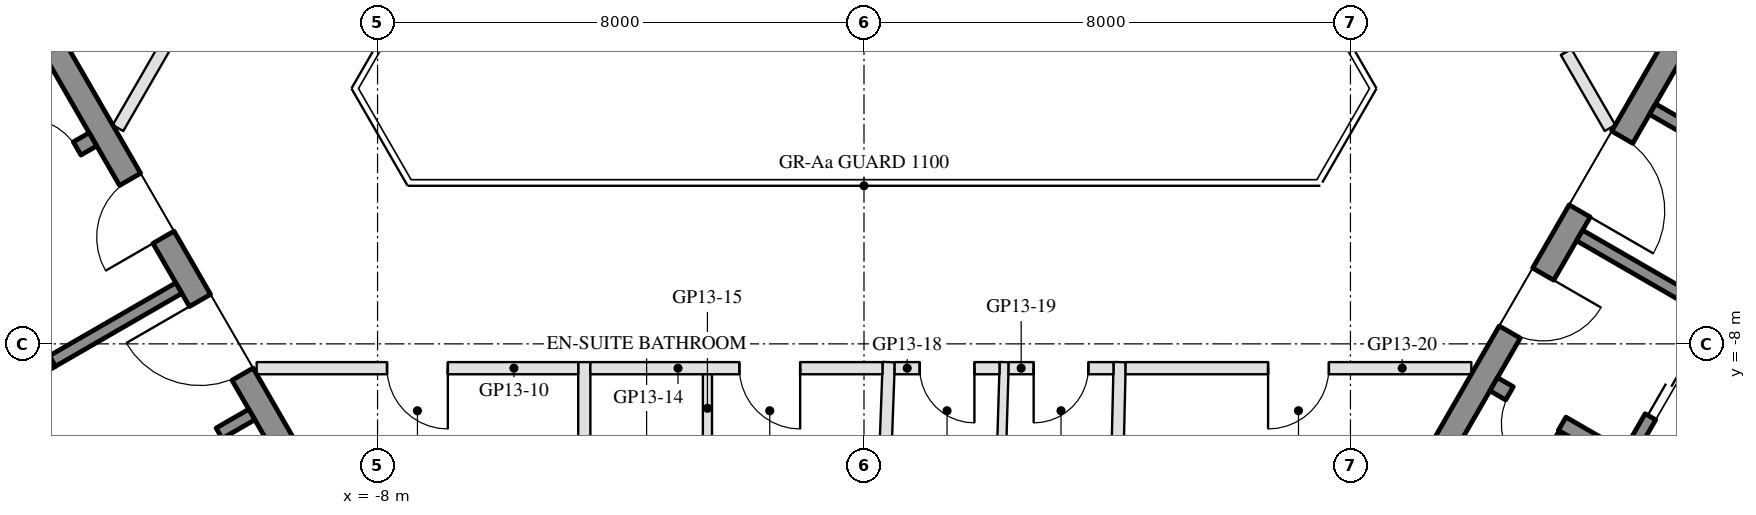
"""IFC4 building model, lengths in metres.
Left out: names, types, materials, properties, quantities, classifications, styles, units other than length and angle.
Written with IfcOpenShell. Run it as: python <this file> out.ifc"""

import sys

from ifc_helpers import new_model, si_unit, direction, frame, frame_2d, origin, place, context, subcontext, project, spatial, rectangle, extrude, element, fill, save


model = new_model("IFC4")
c1 = context("Model", 3, precision=1e-05, world=origin(), true_north=direction((0.0, 1.0)))
c2 = subcontext(c1, "Body", "Model", "MODEL_VIEW")
j1 = project(units=[si_unit("LENGTHUNIT", "METRE"), si_unit("PLANEANGLEUNIT", "RADIAN")], contexts=[c1])
p1 = place(None, origin())
s1 = spatial("IfcSite", under=j1, at=p1, CompositionType="ELEMENT")
p2 = place(p1, origin())
s2 = spatial("IfcBuilding", under=s1, at=p2, CompositionType="ELEMENT")
p3 = place(p2, frame((0.0, 0.0, 154.0)))
s3 = spatial("IfcBuildingStorey", under=s2, at=p3, CompositionType="ELEMENT", Elevation=154.0)
p4 = place(p3, frame((-13.845, -2.22, 0.0), z_axis=(0.0, 0.0, 1.0), x_axis=(0.500004234368, -0.866022959057, 0.0)))
e1 = element("IfcWall", 1, at=p4, inside=s3, PredefinedType="SHEAR", context=c2, shape_type="SweptSolid", body=[
    extrude(rectangle(XDim=10.0, YDim=0.4, at=frame_2d((5.0, 0.0))), origin(), (0.0, 0.0, 1.0), 3.5),
])
p5 = place(p4, frame((3.55, 0.0, 0.0)))
e2 = element("IfcOpeningElement", 2, at=p5, cuts=e1, PredefinedType="OPENING", context=c2, shape_type="SweptSolid", body=[
    extrude(rectangle(XDim=1.1, YDim=2.1, at=frame_2d((0.55, 1.05))), frame((0.0, 0.21, 0.0), z_axis=(0.0, -1.0, 0.0), x_axis=(1.0, 0.0, 0.0)), (0.0, 0.0, 1.0), 0.42),
])
p6 = place(p4, frame((5.85, 0.0, 0.0)))
e3 = element("IfcOpeningElement", 3, at=p6, cuts=e1, PredefinedType="OPENING", context=c2, shape_type="SweptSolid", body=[
    extrude(rectangle(XDim=1.4, YDim=2.1, at=frame_2d((0.7, 1.05))), frame((0.0, 0.21, 0.0), z_axis=(0.0, -1.0, 0.0), x_axis=(1.0, 0.0, 0.0)), (0.0, 0.0, 1.0), 0.42),
])
p7 = place(p3, frame((-12.681, -4.636, 0.0), z_axis=(0.0, 0.0, 1.0), x_axis=(-0.866021702275, -0.500006411147, 0.0)))
e4 = element("IfcWall", 4, at=p7, inside=s3, PredefinedType="SHEAR", context=c2, shape_type="SweptSolid", body=[
    extrude(rectangle(XDim=6.45, YDim=0.25, at=frame_2d((3.225, 0.0))), origin(), (0.0, 0.0, 1.0), 3.5),
])
p8 = place(p7, frame((0.3, 0.0, 0.0)))
e5 = element("IfcOpeningElement", 5, at=p8, cuts=e4, PredefinedType="OPENING", context=c2, shape_type="SweptSolid", body=[
    extrude(rectangle(XDim=1.0, YDim=2.1, at=frame_2d((0.5, 1.05))), frame((0.0, 0.135, 0.0), z_axis=(0.0, -1.0, 0.0), x_axis=(1.0, 0.0, 0.0)), (0.0, 0.0, 1.0), 0.27),
])
p9 = place(p3, frame((-14.783, -5.995, 0.0), z_axis=(0.0, 0.0, 1.0), x_axis=(0.49994636267, -0.866056369097, 0.0)))
e6 = element("IfcWall", 6, at=p9, inside=s3, PredefinedType="SHEAR", context=c2, shape_type="SweptSolid", body=[
    extrude(rectangle(XDim=2.8, YDim=0.2, at=frame_2d((1.4, 0.0))), origin(), (0.0, 0.0, 1.0), 3.5),
])
p10 = place(p9, frame((0.7, 0.0, 0.0)))
e7 = element("IfcOpeningElement", 7, at=p10, cuts=e6, PredefinedType="OPENING", context=c2, shape_type="SweptSolid", body=[
    extrude(rectangle(XDim=1.2, YDim=2.1, at=frame_2d((0.6, 1.05))), frame((0.0, 0.11, 0.0), z_axis=(0.0, -1.0, 0.0), x_axis=(1.0, 0.0, 0.0)), (0.0, 0.0, 1.0), 0.22),
])
p11 = place(p3, frame((-11.268, -7.083, 0.0), z_axis=(0.0, 0.0, 1.0), x_axis=(-0.866050077142, -0.499957262057, 0.0)))
e8 = element("IfcWall", 8, at=p11, inside=s3, PredefinedType="SHEAR", context=c2, shape_type="SweptSolid", body=[
    extrude(rectangle(XDim=2.4, YDim=0.2, at=frame_2d((1.2, 0.0))), origin(), (0.0, 0.0, 1.0), 3.5),
])
p12 = place(p3, frame((-10.068, -9.162, 0.0), z_axis=(0.0, 0.0, 1.0), x_axis=(-0.866032725843, -0.499987317609, 0.0)))
e9 = element("IfcWall", 9, at=p12, inside=s3, PredefinedType="SHEAR", context=c2, shape_type="SweptSolid", body=[
    extrude(rectangle(XDim=10.16, YDim=0.2, at=frame_2d((5.08, 0.0))), origin(), (0.0, 0.0, 1.0), 3.5),
])
p13 = place(p12, frame((0.62, 0.0, 0.0)))
e10 = element("IfcOpeningElement", 10, at=p13, cuts=e9, PredefinedType="OPENING", context=c2, shape_type="SweptSolid", body=[
    extrude(rectangle(XDim=1.1, YDim=2.1, at=frame_2d((0.55, 1.05))), frame((0.0, 0.11, 0.0), z_axis=(0.0, -1.0, 0.0), x_axis=(1.0, 0.0, 0.0)), (0.0, 0.0, 1.0), 0.22),
])
p14 = place(p12, frame((3.16, 0.0, 0.0)))
e11 = element("IfcOpeningElement", 11, at=p14, cuts=e9, PredefinedType="OPENING", context=c2, shape_type="SweptSolid", body=[
    extrude(rectangle(XDim=1.1, YDim=2.1, at=frame_2d((0.55, 1.05))), frame((0.0, 0.11, 0.0), z_axis=(0.0, -1.0, 0.0), x_axis=(1.0, 0.0, 0.0)), (0.0, 0.0, 1.0), 0.22),
])
p15 = place(p12, frame((5.7, 0.0, 0.0)))
e12 = element("IfcOpeningElement", 12, at=p15, cuts=e9, PredefinedType="OPENING", context=c2, shape_type="SweptSolid", body=[
    extrude(rectangle(XDim=1.1, YDim=2.1, at=frame_2d((0.55, 1.05))), frame((0.0, 0.11, 0.0), z_axis=(0.0, -1.0, 0.0), x_axis=(1.0, 0.0, 0.0)), (0.0, 0.0, 1.0), 0.22),
])
p16 = place(p12, frame((8.24, 0.0, 0.0)))
e13 = element("IfcOpeningElement", 13, at=p16, cuts=e9, PredefinedType="OPENING", context=c2, shape_type="SweptSolid", body=[
    extrude(rectangle(XDim=1.1, YDim=2.1, at=frame_2d((0.55, 1.05))), frame((0.0, 0.11, 0.0), z_axis=(0.0, -1.0, 0.0), x_axis=(1.0, 0.0, 0.0)), (0.0, 0.0, 1.0), 0.22),
])
p17 = place(p3, frame((8.845, -10.88, 0.0), z_axis=(0.0, 0.0, 1.0), x_axis=(0.500004234368, 0.866022959057, 0.0)))
e14 = element("IfcWall", 14, at=p17, inside=s3, PredefinedType="SHEAR", context=c2, shape_type="SweptSolid", body=[
    extrude(rectangle(XDim=10.0, YDim=0.4, at=frame_2d((5.0, 0.0))), origin(), (0.0, 0.0, 1.0), 3.5),
])
p18 = place(p17, frame((3.55, 0.0, 0.0)))
e15 = element("IfcOpeningElement", 15, at=p18, cuts=e14, PredefinedType="OPENING", context=c2, shape_type="SweptSolid", body=[
    extrude(rectangle(XDim=1.1, YDim=2.1, at=frame_2d((0.55, 1.05))), frame((0.0, 0.21, 0.0), z_axis=(0.0, -1.0, 0.0), x_axis=(1.0, 0.0, 0.0)), (0.0, 0.0, 1.0), 0.42),
])
p19 = place(p17, frame((5.85, 0.0, 0.0)))
e16 = element("IfcOpeningElement", 16, at=p19, cuts=e14, PredefinedType="OPENING", context=c2, shape_type="SweptSolid", body=[
    extrude(rectangle(XDim=1.4, YDim=2.1, at=frame_2d((0.7, 1.05))), frame((0.0, 0.21, 0.0), z_axis=(0.0, -1.0, 0.0), x_axis=(1.0, 0.0, 0.0)), (0.0, 0.0, 1.0), 0.42),
])
p20 = place(p3, frame((10.356, -8.664, 0.0), z_axis=(0.0, 0.0, 1.0), x_axis=(0.866028629588, -0.499994412703, 0.0)))
e17 = element("IfcWall", 17, at=p20, inside=s3, PredefinedType="SHEAR", context=c2, shape_type="SweptSolid", body=[
    extrude(rectangle(XDim=6.45, YDim=0.25, at=frame_2d((3.225, 0.0))), origin(), (0.0, 0.0, 1.0), 3.5),
])
p21 = place(p20, frame((0.3, 0.0, 0.0)))
e18 = element("IfcOpeningElement", 18, at=p21, cuts=e17, PredefinedType="OPENING", context=c2, shape_type="SweptSolid", body=[
    extrude(rectangle(XDim=1.0, YDim=2.1, at=frame_2d((0.5, 1.05))), frame((0.0, 0.135, 0.0), z_axis=(0.0, -1.0, 0.0), x_axis=(1.0, 0.0, 0.0)), (0.0, 0.0, 1.0), 0.27),
])
p22 = place(p3, frame((12.583, -9.805, 0.0), z_axis=(0.0, 0.0, 1.0), x_axis=(0.49994636267, 0.866056369097, 0.0)))
e19 = element("IfcWall", 19, at=p22, inside=s3, PredefinedType="SHEAR", context=c2, shape_type="SweptSolid", body=[
    extrude(rectangle(XDim=2.8, YDim=0.2, at=frame_2d((1.4, 0.0))), origin(), (0.0, 0.0, 1.0), 3.5),
])
p23 = place(p22, frame((0.7, 0.0, 0.0)))
e20 = element("IfcOpeningElement", 20, at=p23, cuts=e19, PredefinedType="OPENING", context=c2, shape_type="SweptSolid", body=[
    extrude(rectangle(XDim=1.2, YDim=2.1, at=frame_2d((0.6, 1.05))), frame((0.0, 0.11, 0.0), z_axis=(0.0, -1.0, 0.0), x_axis=(1.0, 0.0, 0.0)), (0.0, 0.0, 1.0), 0.22),
])
p24 = place(p3, frame((11.768, -6.217, 0.0), z_axis=(0.0, 0.0, 1.0), x_axis=(0.866050077142, -0.499957262057, 0.0)))
e21 = element("IfcWall", 21, at=p24, inside=s3, PredefinedType="SHEAR", context=c2, shape_type="SweptSolid", body=[
    extrude(rectangle(XDim=2.4, YDim=0.2, at=frame_2d((1.2, 0.0))), origin(), (0.0, 0.0, 1.0), 3.5),
])
p25 = place(p3, frame((12.968, -4.138, 0.0), z_axis=(0.0, 0.0, 1.0), x_axis=(0.866028328073, -0.49999493495, 0.0)))
e22 = element("IfcWall", 22, at=p25, inside=s3, PredefinedType="SHEAR", context=c2, shape_type="SweptSolid", body=[
    extrude(rectangle(XDim=10.16, YDim=0.2, at=frame_2d((5.08, 0.0))), origin(), (0.0, 0.0, 1.0), 3.5),
])
p26 = place(p25, frame((3.26, 0.0, 0.0)))
e23 = element("IfcOpeningElement", 23, at=p26, cuts=e22, PredefinedType="OPENING", context=c2, shape_type="SweptSolid", body=[
    extrude(rectangle(XDim=0.9, YDim=2.1, at=frame_2d((0.45, 1.05))), frame((0.0, 0.11, 0.0), z_axis=(0.0, -1.0, 0.0), x_axis=(1.0, 0.0, 0.0)), (0.0, 0.0, 1.0), 0.22),
])
p27 = place(p25, frame((8.34, 0.0, 0.0)))
e24 = element("IfcOpeningElement", 24, at=p27, cuts=e22, PredefinedType="OPENING", context=c2, shape_type="SweptSolid", body=[
    extrude(rectangle(XDim=0.9, YDim=2.1, at=frame_2d((0.45, 1.05))), frame((0.0, 0.11, 0.0), z_axis=(0.0, -1.0, 0.0), x_axis=(1.0, 0.0, 0.0)), (0.0, 0.0, 1.0), 0.22),
])
p28 = place(p3, frame((-4.6, -18.38, 0.0), z_axis=(0.0, 0.0, 1.0), x_axis=(0.0, 1.0, 0.0)))
e25 = element("IfcWall", 25, at=p28, inside=s3, PredefinedType="PARTITIONING", context=c2, shape_type="SweptSolid", body=[
    extrude(rectangle(XDim=10.08, YDim=0.2, at=frame_2d((5.04, 0.0))), origin(), (0.0, 0.0, 1.0), 3.06),
])
p29 = place(p3, frame((0.055, -17.805, 0.0), z_axis=(0.0, 0.0, 1.0), x_axis=(0.037090458059, 0.999311912228, 0.0)))
e26 = element("IfcWall", 26, at=p29, inside=s3, PredefinedType="PARTITIONING", context=c2, shape_type="SweptSolid", body=[
    extrude(rectangle(XDim=9.511, YDim=0.2, at=frame_2d((4.756, 0.0))), origin(), (0.0, 0.0, 1.0), 2.95),
])
p30 = place(p3, frame((3.95, -19.28, 0.0), z_axis=(0.0, 0.0, 1.0), x_axis=(0.023184943176, 0.999731193076, 0.0)))
e27 = element("IfcWall", 27, at=p30, inside=s3, PredefinedType="PARTITIONING", context=c2, shape_type="SweptSolid", body=[
    extrude(rectangle(XDim=10.983, YDim=0.2, at=frame_2d((5.491, 0.0))), origin(), (0.0, 0.0, 1.0), 2.95),
])
p31 = place(p3, frame((-4.7, -8.4, 0.0), z_axis=(0.0, 0.0, 1.0), x_axis=(-1.0, 0.0, 0.0)))
e28 = element("IfcWall", 28, at=p31, inside=s3, PredefinedType="PARTITIONING", context=c2, shape_type="SweptSolid", body=[
    extrude(rectangle(XDim=5.288, YDim=0.2, at=frame_2d((2.644, 0.0))), origin(), (0.0, 0.0, 1.0), 2.95),
])
p32 = place(p31, frame((2.144, 0.0, 0.0)))
e29 = element("IfcOpeningElement", 29, at=p32, cuts=e28, PredefinedType="OPENING", context=c2, shape_type="SweptSolid", body=[
    extrude(rectangle(XDim=1.0, YDim=2.1, at=frame_2d((0.5, 1.05))), frame((0.0, 0.11, 0.0), z_axis=(0.0, -1.0, 0.0), x_axis=(1.0, 0.0, 0.0)), (0.0, 0.0, 1.0), 0.22),
])
p33 = place(p3, frame((0.304, -8.4, 0.0), z_axis=(0.0, 0.0, 1.0), x_axis=(-1.0, 0.0, 0.0)))
e30 = element("IfcWall", 30, at=p33, inside=s3, PredefinedType="PARTITIONING", context=c2, shape_type="SweptSolid", body=[
    extrude(rectangle(XDim=4.804, YDim=0.2, at=frame_2d((2.402, 0.0))), origin(), (0.0, 0.0, 1.0), 2.95),
])
p34 = place(p33, frame((1.354, 0.0, 0.0)))
e31 = element("IfcOpeningElement", 31, at=p34, cuts=e30, PredefinedType="OPENING", context=c2, shape_type="SweptSolid", body=[
    extrude(rectangle(XDim=1.0, YDim=2.1, at=frame_2d((0.5, 1.05))), frame((0.0, 0.11, 0.0), z_axis=(0.0, -1.0, 0.0), x_axis=(1.0, 0.0, 0.0)), (0.0, 0.0, 1.0), 0.22),
])
p35 = place(p3, frame((-2.575, -11.3, 0.0), z_axis=(0.0, 0.0, 1.0), x_axis=(0.0, 1.0, 0.0)))
e32 = element("IfcWall", 32, at=p35, inside=s3, PredefinedType="PARTITIONING", context=c2, shape_type="SweptSolid", body=[
    extrude(rectangle(XDim=2.8, YDim=0.15, at=frame_2d((1.4, 0.0))), origin(), (0.0, 0.0, 1.0), 3.55),
])
p36 = place(p35, frame((0.5, 0.0, 0.0)))
e33 = element("IfcOpeningElement", 33, at=p36, cuts=e32, PredefinedType="OPENING", context=c2, shape_type="SweptSolid", body=[
    extrude(rectangle(XDim=0.9, YDim=2.1, at=frame_2d((0.45, 1.05))), frame((0.0, 0.085, 0.0), z_axis=(0.0, -1.0, 0.0), x_axis=(1.0, 0.0, 0.0)), (0.0, 0.0, 1.0), 0.17),
])
p37 = place(p3, frame((1.975, -19.28, 0.0), z_axis=(0.0, 0.0, 1.0), x_axis=(0.030114853757, 0.999546444935, 0.0)))
e34 = element("IfcWall", 34, at=p37, inside=s3, PredefinedType="PARTITIONING", context=c2, shape_type="SweptSolid", body=[
    extrude(rectangle(XDim=10.985, YDim=0.15, at=frame_2d((5.492, 0.0))), origin(), (0.0, 0.0, 1.0), 3.06),
])
p38 = place(p3, frame((2.228, -8.4, 0.0), z_axis=(0.0, 0.0, 1.0), x_axis=(-1.0, 0.0, 0.0)))
e35 = element("IfcWall", 35, at=p38, inside=s3, PredefinedType="PARTITIONING", context=c2, shape_type="SweptSolid", body=[
    extrude(rectangle(XDim=1.724, YDim=0.2, at=frame_2d((0.862, 0.0))), origin(), (0.0, 0.0, 1.0), 3.55),
])
p39 = place(p38, frame((0.412, 0.0, 0.0)))
e36 = element("IfcOpeningElement", 36, at=p39, cuts=e35, PredefinedType="OPENING", context=c2, shape_type="SweptSolid", body=[
    extrude(rectangle(XDim=0.9, YDim=2.1, at=frame_2d((0.45, 1.05))), frame((0.0, 0.11, 0.0), z_axis=(0.0, -1.0, 0.0), x_axis=(1.0, 0.0, 0.0)), (0.0, 0.0, 1.0), 0.22),
])
p40 = place(p3, frame((4.102, -8.4, 0.0), z_axis=(0.0, 0.0, 1.0), x_axis=(-1.0, 0.0, 0.0)))
e37 = element("IfcWall", 37, at=p40, inside=s3, PredefinedType="PARTITIONING", context=c2, shape_type="SweptSolid", body=[
    extrude(rectangle(XDim=1.724, YDim=0.2, at=frame_2d((0.862, 0.0))), origin(), (0.0, 0.0, 1.0), 2.95),
])
p41 = place(p40, frame((0.412, 0.0, 0.0)))
e38 = element("IfcOpeningElement", 38, at=p41, cuts=e37, PredefinedType="OPENING", context=c2, shape_type="SweptSolid", body=[
    extrude(rectangle(XDim=0.9, YDim=2.1, at=frame_2d((0.45, 1.05))), frame((0.0, 0.11, 0.0), z_axis=(0.0, -1.0, 0.0), x_axis=(1.0, 0.0, 0.0)), (0.0, 0.0, 1.0), 0.22),
])
p42 = place(p3, frame((9.988, -8.4, 0.0), z_axis=(0.0, 0.0, 1.0), x_axis=(-1.0, 0.0, 0.0)))
e39 = element("IfcWall", 39, at=p42, inside=s3, PredefinedType="PARTITIONING", context=c2, shape_type="SweptSolid", body=[
    extrude(rectangle(XDim=5.686, YDim=0.2, at=frame_2d((2.843, 0.0))), origin(), (0.0, 0.0, 1.0), 2.95),
])
p43 = place(p42, frame((2.343, 0.0, 0.0)))
e40 = element("IfcOpeningElement", 40, at=p43, cuts=e39, PredefinedType="OPENING", context=c2, shape_type="SweptSolid", body=[
    extrude(rectangle(XDim=1.0, YDim=2.1, at=frame_2d((0.5, 1.05))), frame((0.0, 0.11, 0.0), z_axis=(0.0, -1.0, 0.0), x_axis=(1.0, 0.0, 0.0)), (0.0, 0.0, 1.0), 0.22),
])
p44 = place(p3, frame((10.325, -1.083, 0.0), z_axis=(0.0, 0.0, 1.0), x_axis=(0.500008716408, -0.866020371305, 0.0)))
e41 = element("IfcWall", 41, at=p44, inside=s3, PredefinedType="PARTITIONING", context=c2, shape_type="SweptSolid", body=[
    extrude(rectangle(XDim=3.888, YDim=0.2, at=frame_2d((1.944, 0.0))), origin(), (0.0, 0.0, 1.0), 2.95),
])
p45 = place(p44, frame((1.444, 0.0, 0.0)))
e42 = element("IfcOpeningElement", 42, at=p45, cuts=e41, PredefinedType="OPENING", context=c2, shape_type="SweptSolid", body=[
    extrude(rectangle(XDim=1.0, YDim=2.1, at=frame_2d((0.5, 1.05))), frame((0.0, 0.11, 0.0), z_axis=(0.0, -1.0, 0.0), x_axis=(1.0, 0.0, 0.0)), (0.0, 0.0, 1.0), 0.22),
])
p46 = place(p3, frame((-12.269, -4.45, 0.0), z_axis=(0.0, 0.0, 1.0), x_axis=(0.500011931275, 0.86601851515, 0.0)))
e43 = element("IfcWall", 43, at=p46, inside=s3, PredefinedType="PARTITIONING", context=c2, shape_type="SweptSolid", body=[
    extrude(rectangle(XDim=4.088, YDim=0.2, at=frame_2d((2.044, 0.0))), origin(), (0.0, 0.0, 1.0), 2.95),
])
p47 = place(p46, frame((1.544, 0.0, 0.0)))
e44 = element("IfcOpeningElement", 44, at=p47, cuts=e43, PredefinedType="OPENING", context=c2, shape_type="SweptSolid", body=[
    extrude(rectangle(XDim=1.0, YDim=2.1, at=frame_2d((0.5, 1.05))), frame((0.0, 0.11, 0.0), z_axis=(0.0, -1.0, 0.0), x_axis=(1.0, 0.0, 0.0)), (0.0, 0.0, 1.0), 0.22),
])
p48 = place(p13, origin())
e45 = element("IfcDoor", 45, at=p48, inside=s3, OperationType="DOUBLE_DOOR_SLIDING", PredefinedType="DOOR", context=c2, shape_type="SweptSolid", body=[
    extrude(rectangle(XDim=1.1, YDim=2.1, at=frame_2d((0.55, 1.05))), frame((0.0, 0.025, 0.0), z_axis=(0.0, -1.0, 0.0), x_axis=(1.0, 0.0, 0.0)), (0.0, 0.0, 1.0), 0.05),
])
fill(e10, e45)
p49 = place(p5, frame((1.1, 0.0, 0.0), z_axis=(0.0, 0.0, 1.0), x_axis=(-1.0, 0.0, 0.0)))
e46 = element("IfcDoor", 46, at=p49, inside=s3, OperationType="SINGLE_SWING_LEFT", PredefinedType="DOOR", context=c2, shape_type="SweptSolid", body=[
    extrude(rectangle(XDim=1.1, YDim=2.1, at=frame_2d((0.55, 1.05))), frame((0.0, 0.025, 0.0), z_axis=(0.0, -1.0, 0.0), x_axis=(1.0, 0.0, 0.0)), (0.0, 0.0, 1.0), 0.05),
])
fill(e2, e46)
p50 = place(p6, frame((1.4, 0.0, 0.0), z_axis=(0.0, 0.0, 1.0), x_axis=(-1.0, 0.0, 0.0)))
e47 = element("IfcDoor", 47, at=p50, inside=s3, OperationType="DOUBLE_DOOR_SINGLE_SWING", PredefinedType="DOOR", context=c2, shape_type="SweptSolid", body=[
    extrude(rectangle(XDim=1.4, YDim=2.1, at=frame_2d((0.7, 1.05))), frame((0.0, 0.025, 0.0), z_axis=(0.0, -1.0, 0.0), x_axis=(1.0, 0.0, 0.0)), (0.0, 0.0, 1.0), 0.05),
])
fill(e3, e47)
p51 = place(p8, frame((1.0, 0.0, 0.0), z_axis=(0.0, 0.0, 1.0), x_axis=(-1.0, 0.0, 0.0)))
e48 = element("IfcDoor", 48, at=p51, inside=s3, OperationType="SINGLE_SWING_LEFT", PredefinedType="DOOR", context=c2, shape_type="SweptSolid", body=[
    extrude(rectangle(XDim=1.0, YDim=2.1, at=frame_2d((0.5, 1.05))), frame((0.0, 0.025, 0.0), z_axis=(0.0, -1.0, 0.0), x_axis=(1.0, 0.0, 0.0)), (0.0, 0.0, 1.0), 0.05),
])
fill(e5, e48)
p52 = place(p23, origin())
e49 = element("IfcDoor", 49, at=p52, inside=s3, OperationType="DOUBLE_DOOR_SLIDING", PredefinedType="DOOR", context=c2, shape_type="SweptSolid", body=[
    extrude(rectangle(XDim=1.2, YDim=2.1, at=frame_2d((0.6, 1.05))), frame((0.0, 0.025, 0.0), z_axis=(0.0, -1.0, 0.0), x_axis=(1.0, 0.0, 0.0)), (0.0, 0.0, 1.0), 0.05),
])
fill(e20, e49)
p53 = place(p18, frame((1.1, 0.0, 0.0), z_axis=(0.0, 0.0, 1.0), x_axis=(-1.0, 0.0, 0.0)))
e50 = element("IfcDoor", 50, at=p53, inside=s3, OperationType="SINGLE_SWING_LEFT", PredefinedType="DOOR", context=c2, shape_type="SweptSolid", body=[
    extrude(rectangle(XDim=1.1, YDim=2.1, at=frame_2d((0.55, 1.05))), frame((0.0, 0.025, 0.0), z_axis=(0.0, -1.0, 0.0), x_axis=(1.0, 0.0, 0.0)), (0.0, 0.0, 1.0), 0.05),
])
fill(e15, e50)
p54 = place(p19, frame((1.4, 0.0, 0.0), z_axis=(0.0, 0.0, 1.0), x_axis=(-1.0, 0.0, 0.0)))
e51 = element("IfcDoor", 51, at=p54, inside=s3, OperationType="DOUBLE_DOOR_SINGLE_SWING", PredefinedType="DOOR", context=c2, shape_type="SweptSolid", body=[
    extrude(rectangle(XDim=1.4, YDim=2.1, at=frame_2d((0.7, 1.05))), frame((0.0, 0.025, 0.0), z_axis=(0.0, -1.0, 0.0), x_axis=(1.0, 0.0, 0.0)), (0.0, 0.0, 1.0), 0.05),
])
fill(e16, e51)
p55 = place(p21, frame((1.0, 0.0, 0.0), z_axis=(0.0, 0.0, 1.0), x_axis=(-1.0, 0.0, 0.0)))
e52 = element("IfcDoor", 52, at=p55, inside=s3, OperationType="SINGLE_SWING_LEFT", PredefinedType="DOOR", context=c2, shape_type="SweptSolid", body=[
    extrude(rectangle(XDim=1.0, YDim=2.1, at=frame_2d((0.5, 1.05))), frame((0.0, 0.025, 0.0), z_axis=(0.0, -1.0, 0.0), x_axis=(1.0, 0.0, 0.0)), (0.0, 0.0, 1.0), 0.05),
])
fill(e18, e52)
p56 = place(p32, origin())
e53 = element("IfcDoor", 53, at=p56, inside=s3, OperationType="SINGLE_SWING_LEFT", PredefinedType="DOOR", context=c2, shape_type="SweptSolid", body=[
    extrude(rectangle(XDim=1.0, YDim=2.1, at=frame_2d((0.5, 1.05))), frame((0.0, 0.025, 0.0), z_axis=(0.0, -1.0, 0.0), x_axis=(1.0, 0.0, 0.0)), (0.0, 0.0, 1.0), 0.05),
])
fill(e29, e53)
p57 = place(p34, origin())
e54 = element("IfcDoor", 54, at=p57, inside=s3, OperationType="SINGLE_SWING_LEFT", PredefinedType="DOOR", context=c2, shape_type="SweptSolid", body=[
    extrude(rectangle(XDim=1.0, YDim=2.1, at=frame_2d((0.5, 1.05))), frame((0.0, 0.025, 0.0), z_axis=(0.0, -1.0, 0.0), x_axis=(1.0, 0.0, 0.0)), (0.0, 0.0, 1.0), 0.05),
])
fill(e31, e54)
p58 = place(p39, origin())
e55 = element("IfcDoor", 55, at=p58, inside=s3, OperationType="SINGLE_SWING_LEFT", PredefinedType="DOOR", context=c2, shape_type="SweptSolid", body=[
    extrude(rectangle(XDim=0.9, YDim=2.1, at=frame_2d((0.45, 1.05))), frame((0.0, 0.025, 0.0), z_axis=(0.0, -1.0, 0.0), x_axis=(1.0, 0.0, 0.0)), (0.0, 0.0, 1.0), 0.05),
])
fill(e36, e55)
p59 = place(p41, origin())
e56 = element("IfcDoor", 56, at=p59, inside=s3, OperationType="SINGLE_SWING_RIGHT", PredefinedType="DOOR", context=c2, shape_type="SweptSolid", body=[
    extrude(rectangle(XDim=0.9, YDim=2.1, at=frame_2d((0.45, 1.05))), frame((0.0, 0.025, 0.0), z_axis=(0.0, -1.0, 0.0), x_axis=(1.0, 0.0, 0.0)), (0.0, 0.0, 1.0), 0.05),
])
fill(e38, e56)
p60 = place(p43, origin())
e57 = element("IfcDoor", 57, at=p60, inside=s3, OperationType="SINGLE_SWING_RIGHT", PredefinedType="DOOR", context=c2, shape_type="SweptSolid", body=[
    extrude(rectangle(XDim=1.0, YDim=2.1, at=frame_2d((0.5, 1.05))), frame((0.0, 0.025, 0.0), z_axis=(0.0, -1.0, 0.0), x_axis=(1.0, 0.0, 0.0)), (0.0, 0.0, 1.0), 0.05),
])
fill(e40, e57)
p61 = place(p45, origin())
e58 = element("IfcDoor", 58, at=p61, inside=s3, OperationType="SINGLE_SWING_LEFT", PredefinedType="DOOR", context=c2, shape_type="SweptSolid", body=[
    extrude(rectangle(XDim=1.0, YDim=2.1, at=frame_2d((0.5, 1.05))), frame((0.0, 0.025, 0.0), z_axis=(0.0, -1.0, 0.0), x_axis=(1.0, 0.0, 0.0)), (0.0, 0.0, 1.0), 0.05),
])
fill(e42, e58)
save(model, sys.argv[1])
